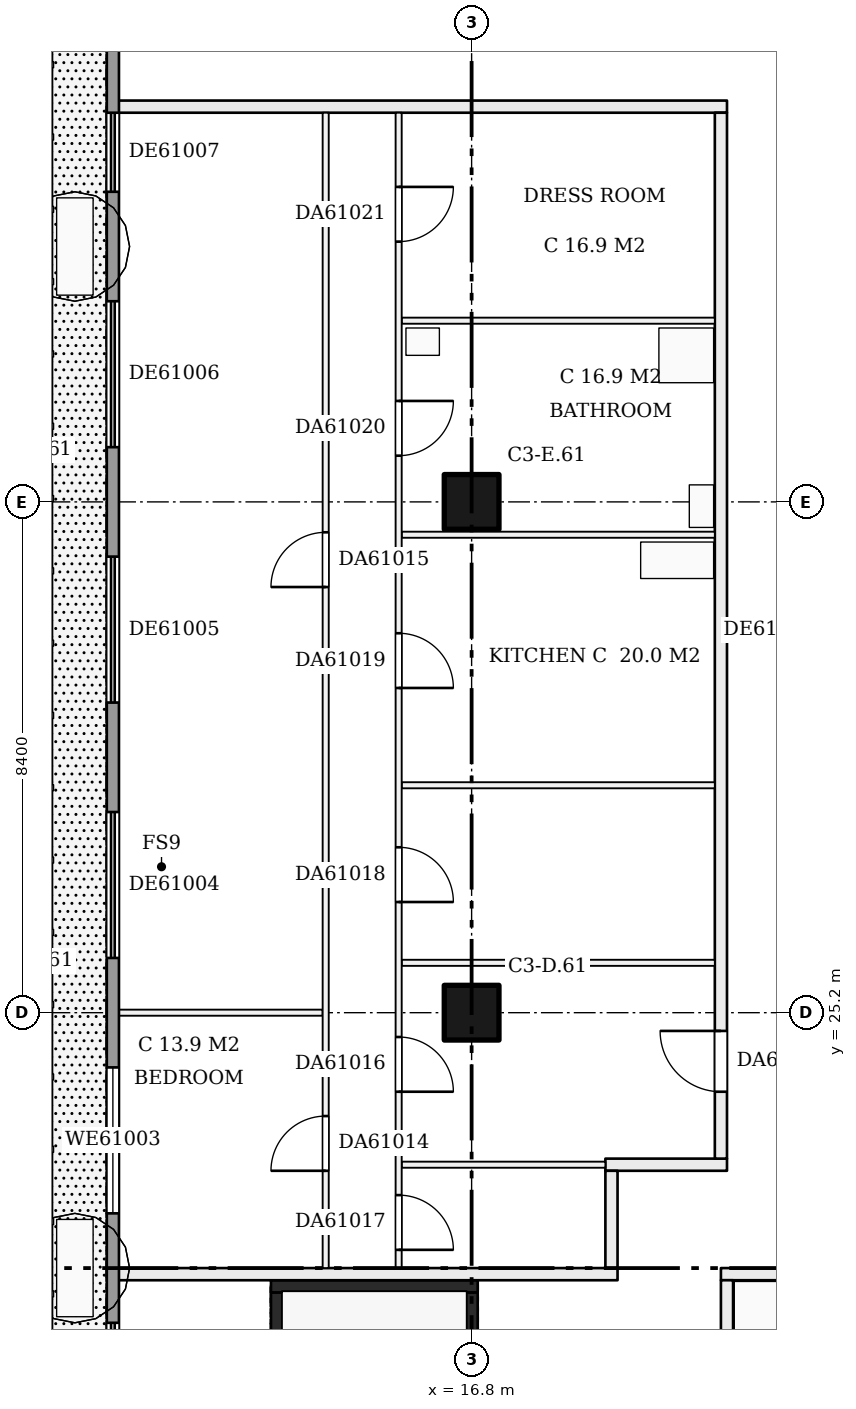
"""IFC4 building model, lengths in metres.
Left out: names, types, materials, properties, quantities, classifications, styles, units other than length and angle.
Written with IfcOpenShell. Run it as: python <this file> out.ifc"""

import sys

from ifc_helpers import new_model, si_unit, direction, frame, frame_2d, origin, origin_2d, place, context, subcontext, project, spatial, rectangle, extrude, element, fill, save


model = new_model("IFC4")
c1 = context("Model", 3, precision=1e-05, world=origin(), true_north=direction((0.0, 1.0)))
c2 = subcontext(c1, "Body", "Model", "MODEL_VIEW")
j1 = project(units=[si_unit("LENGTHUNIT", "METRE"), si_unit("PLANEANGLEUNIT", "RADIAN")], contexts=[c1])
p1 = place(None, origin())
s1 = spatial("IfcSite", under=j1, at=p1, CompositionType="ELEMENT")
p2 = place(p1, origin())
s2 = spatial("IfcBuilding", under=s1, at=p2, CompositionType="ELEMENT")
p3 = place(p2, frame((0.0, 0.0, 235.2)))
s3 = spatial("IfcBuildingStorey", under=s2, at=p3, CompositionType="ELEMENT", Elevation=235.2)
for number, where, z_axis, x_axis in (
    (1, (16.8, 25.2, 0.0), (0.0, 0.0, 1.0), (1.0, 0.0, 0.0)),
    (2, (16.8, 33.6, 0.0), (0.0, 0.0, 1.0), (1.0, 0.0, 0.0)),
):
    element("IfcColumn", number, at=place(p3, frame(where, z_axis=z_axis, x_axis=x_axis)), inside=s3, PredefinedType="COLUMN", context=c2, shape_type="SweptSolid", body=[
        extrude(rectangle(XDim=0.9, YDim=0.9, at=origin_2d()), origin(), (0.0, 0.0, 1.0), 3.22),
    ])
p4 = place(p3, frame((13.6, 13.8, 0.0), z_axis=(0.0, 0.0, 1.0), x_axis=(0.0, 1.0, 0.0)))
e3 = element("IfcWall", 3, at=p4, inside=s3, PredefinedType="SHEAR", context=c2, shape_type="SweptSolid", body=[
    extrude(rectangle(XDim=6.8, YDim=0.2, at=frame_2d((3.4, 0.0))), origin(), (0.0, 0.0, 1.0), 3.22),
])
p5 = place(p3, frame((16.8, 13.8, 0.0), z_axis=(0.0, 0.0, 1.0), x_axis=(0.0, 1.0, 0.0)))
e4 = element("IfcWall", 4, at=p5, inside=s3, PredefinedType="SHEAR", context=c2, shape_type="SweptSolid", body=[
    extrude(rectangle(XDim=6.8, YDim=0.2, at=frame_2d((3.4, 0.0))), origin(), (0.0, 0.0, 1.0), 3.22),
])
p6 = place(p5, frame((0.1, 0.0, 0.0)))
e5 = element("IfcOpeningElement", 5, at=p6, cuts=e4, PredefinedType="OPENING", context=c2, shape_type="SweptSolid", body=[
    extrude(rectangle(XDim=1.0, YDim=2.1, at=frame_2d((0.5, 1.05))), frame((0.0, 0.11, 0.0), z_axis=(0.0, -1.0, 0.0), x_axis=(1.0, 0.0, 0.0)), (0.0, 0.0, 1.0), 0.22),
])
p7 = place(p3, frame((13.5, 20.7, 0.0), z_axis=(0.0, 0.0, 1.0), x_axis=(1.0, 0.0, 0.0)))
e6 = element("IfcWall", 6, at=p7, inside=s3, PredefinedType="SHEAR", context=c2, shape_type="SweptSolid", body=[
    extrude(rectangle(XDim=3.4, YDim=0.2, at=frame_2d((1.7, 0.0))), origin(), (0.0, 0.0, 1.0), 3.22),
])
p8 = place(p3, frame((10.9, 20.9, 0.0), z_axis=(0.0, 0.0, 1.0), x_axis=(1.0, 0.0, 0.0)))
e7 = element("IfcWall", 7, at=p8, inside=s3, PredefinedType="PARTITIONING", context=c2, shape_type="SweptSolid", body=[
    extrude(rectangle(XDim=8.3, YDim=0.2, at=frame_2d((4.15, 0.0))), origin(), (0.0, 0.0, 1.0), 3.22),
])
p9 = place(p3, frame((20.9, 20.9, 0.0), z_axis=(0.0, 0.0, 1.0), x_axis=(1.0, 0.0, 0.0)))
e8 = element("IfcWall", 8, at=p9, inside=s3, PredefinedType="PARTITIONING", context=c2, shape_type="SweptSolid", body=[
    extrude(rectangle(XDim=19.3, YDim=0.2, at=frame_2d((9.65, 0.0))), origin(), (0.0, 0.0, 1.0), 3.22),
])
p10 = place(p9, frame((2.58, 0.0, 0.0)))
e9 = element("IfcOpeningElement", 9, at=p10, cuts=e8, PredefinedType="OPENING", context=c2, shape_type="SweptSolid", body=[
    extrude(rectangle(XDim=1.0, YDim=2.1, at=frame_2d((0.5, 1.05))), frame((0.0, 0.11, 0.0), z_axis=(0.0, -1.0, 0.0), x_axis=(1.0, 0.0, 0.0)), (0.0, 0.0, 1.0), 0.22),
])
p11 = place(p3, frame((15.65, 22.7, 0.0), z_axis=(0.0, 0.0, 1.0), x_axis=(1.0, 0.0, 0.0)))
e10 = element("IfcWall", 10, at=p11, inside=s3, PredefinedType="PARTITIONING", context=c2, shape_type="SweptSolid", body=[
    extrude(rectangle(XDim=3.35, YDim=0.1, at=frame_2d((1.675, 0.0))), origin(), (0.0, 0.0, 1.0), 3.22),
])
p12 = place(p3, frame((19.0, 22.7, 0.0), z_axis=(0.0, 0.0, 1.0), x_axis=(1.0, 0.0, 0.0)))
e11 = element("IfcWall", 11, at=p12, inside=s3, PredefinedType="PARTITIONING", context=c2, shape_type="SweptSolid", body=[
    extrude(rectangle(XDim=2.0, YDim=0.2, at=frame_2d((1.0, 0.0))), origin(), (0.0, 0.0, 1.0), 3.22),
])
p13 = place(p3, frame((10.9, 25.2, 0.0), z_axis=(0.0, 0.0, 1.0), x_axis=(1.0, 0.0, 0.0)))
e12 = element("IfcWall", 12, at=p13, inside=s3, PredefinedType="PARTITIONING", context=c2, shape_type="SweptSolid", body=[
    extrude(rectangle(XDim=3.45, YDim=0.1, at=frame_2d((1.725, 0.0))), origin(), (0.0, 0.0, 1.0), 3.22),
])
for number, where, z_axis, x_axis in (
    (13, (15.65, 26.02, 0.0), (0.0, 0.0, 1.0), (1.0, 0.0, 0.0)),
    (14, (15.65, 28.94, 0.0), (0.0, 0.0, 1.0), (1.0, 0.0, 0.0)),
    (15, (15.65, 33.06, 0.0), (0.0, 0.0, 1.0), (1.0, 0.0, 0.0)),
    (16, (15.65, 36.58, 0.0), (0.0, 0.0, 1.0), (1.0, 0.0, 0.0)),
):
    element("IfcWall", number, at=place(p3, frame(where, z_axis=z_axis, x_axis=x_axis)), inside=s3, PredefinedType="PARTITIONING", context=c2, shape_type="SweptSolid", body=[
        extrude(rectangle(XDim=5.15, YDim=0.1, at=frame_2d((2.575, 0.0))), origin(), (0.0, 0.0, 1.0), 3.22),
    ])
p14 = place(p3, frame((10.9, 40.1, 0.0), z_axis=(0.0, 0.0, 1.0), x_axis=(1.0, 0.0, 0.0)))
e17 = element("IfcWall", 17, at=p14, inside=s3, PredefinedType="PARTITIONING", context=c2, shape_type="SweptSolid", body=[
    extrude(rectangle(XDim=10.1, YDim=0.2, at=frame_2d((5.05, 0.0))), origin(), (0.0, 0.0, 1.0), 3.22),
])
p15 = place(p3, frame((14.4, 21.0, 0.0), z_axis=(0.0, 0.0, 1.0), x_axis=(0.0, 1.0, 0.0)))
e18 = element("IfcWall", 18, at=p15, inside=s3, PredefinedType="PARTITIONING", context=c2, shape_type="SweptSolid", body=[
    extrude(rectangle(XDim=19.0, YDim=0.1, at=frame_2d((9.5, 0.0))), origin(), (0.0, 0.0, 1.0), 3.22),
])
p16 = place(p15, frame((1.6, 0.0, 0.0)))
e19 = element("IfcOpeningElement", 19, at=p16, cuts=e18, PredefinedType="OPENING", context=c2, shape_type="SweptSolid", body=[
    extrude(rectangle(XDim=0.9, YDim=2.1, at=frame_2d((0.45, 1.05))), frame((0.0, 0.06, 0.0), z_axis=(0.0, -1.0, 0.0), x_axis=(1.0, 0.0, 0.0)), (0.0, 0.0, 1.0), 0.12),
])
p17 = place(p15, frame((11.2, 0.0, 0.0)))
e20 = element("IfcOpeningElement", 20, at=p17, cuts=e18, PredefinedType="OPENING", context=c2, shape_type="SweptSolid", body=[
    extrude(rectangle(XDim=0.9, YDim=2.1, at=frame_2d((0.45, 1.05))), frame((0.0, 0.06, 0.0), z_axis=(0.0, -1.0, 0.0), x_axis=(1.0, 0.0, 0.0)), (0.0, 0.0, 1.0), 0.12),
])
p18 = place(p3, frame((15.6, 21.0, 0.0), z_axis=(0.0, 0.0, 1.0), x_axis=(0.0, 1.0, 0.0)))
e21 = element("IfcWall", 21, at=p18, inside=s3, PredefinedType="PARTITIONING", context=c2, shape_type="SweptSolid", body=[
    extrude(rectangle(XDim=19.0, YDim=0.1, at=frame_2d((9.5, 0.0))), origin(), (0.0, 0.0, 1.0), 3.22),
])
p19 = place(p18, frame((2.9, 0.0, 0.0)))
e22 = element("IfcOpeningElement", 22, at=p19, cuts=e21, PredefinedType="OPENING", context=c2, shape_type="SweptSolid", body=[
    extrude(rectangle(XDim=0.9, YDim=2.1, at=frame_2d((0.45, 1.05))), frame((0.0, 0.06, 0.0), z_axis=(0.0, -1.0, 0.0), x_axis=(1.0, 0.0, 0.0)), (0.0, 0.0, 1.0), 0.12),
])
p20 = place(p18, frame((0.3, 0.0, 0.0)))
e23 = element("IfcOpeningElement", 23, at=p20, cuts=e21, PredefinedType="OPENING", context=c2, shape_type="SweptSolid", body=[
    extrude(rectangle(XDim=0.9, YDim=2.1, at=frame_2d((0.45, 1.05))), frame((0.0, 0.06, 0.0), z_axis=(0.0, -1.0, 0.0), x_axis=(1.0, 0.0, 0.0)), (0.0, 0.0, 1.0), 0.12),
])
p21 = place(p18, frame((6.02, 0.0, 0.0)))
e24 = element("IfcOpeningElement", 24, at=p21, cuts=e21, PredefinedType="OPENING", context=c2, shape_type="SweptSolid", body=[
    extrude(rectangle(XDim=0.9, YDim=2.1, at=frame_2d((0.45, 1.05))), frame((0.0, 0.06, 0.0), z_axis=(0.0, -1.0, 0.0), x_axis=(1.0, 0.0, 0.0)), (0.0, 0.0, 1.0), 0.12),
])
p22 = place(p18, frame((9.54, 0.0, 0.0)))
e25 = element("IfcOpeningElement", 25, at=p22, cuts=e21, PredefinedType="OPENING", context=c2, shape_type="SweptSolid", body=[
    extrude(rectangle(XDim=0.9, YDim=2.1, at=frame_2d((0.45, 1.05))), frame((0.0, 0.06, 0.0), z_axis=(0.0, -1.0, 0.0), x_axis=(1.0, 0.0, 0.0)), (0.0, 0.0, 1.0), 0.12),
])
p23 = place(p18, frame((13.36, 0.0, 0.0)))
e26 = element("IfcOpeningElement", 26, at=p23, cuts=e21, PredefinedType="OPENING", context=c2, shape_type="SweptSolid", body=[
    extrude(rectangle(XDim=0.9, YDim=2.1, at=frame_2d((0.45, 1.05))), frame((0.0, 0.06, 0.0), z_axis=(0.0, -1.0, 0.0), x_axis=(1.0, 0.0, 0.0)), (0.0, 0.0, 1.0), 0.12),
])
p24 = place(p18, frame((16.88, 0.0, 0.0)))
e27 = element("IfcOpeningElement", 27, at=p24, cuts=e21, PredefinedType="OPENING", context=c2, shape_type="SweptSolid", body=[
    extrude(rectangle(XDim=0.9, YDim=2.1, at=frame_2d((0.45, 1.05))), frame((0.0, 0.06, 0.0), z_axis=(0.0, -1.0, 0.0), x_axis=(1.0, 0.0, 0.0)), (0.0, 0.0, 1.0), 0.12),
])
p25 = place(p3, frame((19.1, 21.0, 0.0), z_axis=(0.0, 0.0, 1.0), x_axis=(0.0, 1.0, 0.0)))
e28 = element("IfcWall", 28, at=p25, inside=s3, PredefinedType="PARTITIONING", context=c2, shape_type="SweptSolid", body=[
    extrude(rectangle(XDim=1.6, YDim=0.2, at=frame_2d((0.8, 0.0))), origin(), (0.0, 0.0, 1.0), 3.22),
])
p26 = place(p3, frame((20.9, 22.8, 0.0), z_axis=(0.0, 0.0, 1.0), x_axis=(0.0, 1.0, 0.0)))
e29 = element("IfcWall", 29, at=p26, inside=s3, PredefinedType="PARTITIONING", context=c2, shape_type="SweptSolid", body=[
    extrude(rectangle(XDim=17.2, YDim=0.2, at=frame_2d((8.6, 0.0))), origin(), (0.0, 0.0, 1.0), 3.22),
])
p27 = place(p26, frame((1.1, 0.0, 0.0)))
e30 = element("IfcOpeningElement", 30, at=p27, cuts=e29, PredefinedType="OPENING", context=c2, shape_type="SweptSolid", body=[
    extrude(rectangle(XDim=1.0, YDim=2.1, at=frame_2d((0.5, 1.05))), frame((0.0, 0.11, 0.0), z_axis=(0.0, -1.0, 0.0), x_axis=(1.0, 0.0, 0.0)), (0.0, 0.0, 1.0), 0.22),
])
p28 = place(p3, frame((21.0, 13.7, 0.0), z_axis=(0.0, 0.0, 1.0), x_axis=(0.0, 1.0, 0.0)))
e31 = element("IfcWall", 31, at=p28, inside=s3, PredefinedType="PARTITIONING", context=c2, shape_type="SweptSolid", body=[
    extrude(rectangle(XDim=7.1, YDim=0.2, at=frame_2d((3.55, 0.0))), origin(), (0.0, 0.0, 1.0), 3.22),
])
p29 = place(p3, frame((10.9, 42.0, 0.0), z_axis=(0.0, 0.0, 1.0), x_axis=(0.0, -1.0, 0.0)))
e32 = element("IfcWall", 32, at=p29, inside=s3, PredefinedType="SOLIDWALL", context=c2, shape_type="SweptSolid", body=[
    extrude(rectangle(XDim=28.6, YDim=0.2, at=frame_2d((14.3, 0.0))), origin(), (0.0, 0.0, 1.0), 3.22),
])
p30 = place(p29, frame((25.9, 0.0, 0.0)))
e33 = element("IfcOpeningElement", 33, at=p30, cuts=e32, PredefinedType="OPENING", context=c2, shape_type="SweptSolid", body=[
    extrude(rectangle(XDim=2.4, YDim=2.2, at=frame_2d((1.2, 1.1))), frame((0.0, 0.11, 0.0), z_axis=(0.0, -1.0, 0.0), x_axis=(1.0, 0.0, 0.0)), (0.0, 0.0, 1.0), 0.22),
])
p31 = place(p29, frame((21.9, 0.0, 0.0)))
e34 = element("IfcOpeningElement", 34, at=p31, cuts=e32, PredefinedType="OPENING", context=c2, shape_type="SweptSolid", body=[
    extrude(rectangle(XDim=2.4, YDim=2.2, at=frame_2d((1.2, 1.1))), frame((0.0, 0.11, 0.0), z_axis=(0.0, -1.0, 0.0), x_axis=(1.0, 0.0, 0.0)), (0.0, 0.0, 1.0), 0.22),
])
p32 = place(p29, frame((17.7, 0.0, 0.9)))
e35 = element("IfcOpeningElement", 35, at=p32, cuts=e32, PredefinedType="OPENING", context=c2, shape_type="SweptSolid", body=[
    extrude(rectangle(XDim=2.4, YDim=1.5, at=frame_2d((1.2, 0.75))), frame((0.0, 0.11, 0.0), z_axis=(0.0, -1.0, 0.0), x_axis=(1.0, 0.0, 0.0)), (0.0, 0.0, 1.0), 0.22),
])
p33 = place(p29, frame((13.5, 0.0, 0.0)))
e36 = element("IfcOpeningElement", 36, at=p33, cuts=e32, PredefinedType="OPENING", context=c2, shape_type="SweptSolid", body=[
    extrude(rectangle(XDim=2.4, YDim=2.2, at=frame_2d((1.2, 1.1))), frame((0.0, 0.11, 0.0), z_axis=(0.0, -1.0, 0.0), x_axis=(1.0, 0.0, 0.0)), (0.0, 0.0, 1.0), 0.22),
])
p34 = place(p29, frame((9.3, 0.0, 0.0)))
e37 = element("IfcOpeningElement", 37, at=p34, cuts=e32, PredefinedType="OPENING", context=c2, shape_type="SweptSolid", body=[
    extrude(rectangle(XDim=2.4, YDim=2.2, at=frame_2d((1.2, 1.1))), frame((0.0, 0.11, 0.0), z_axis=(0.0, -1.0, 0.0), x_axis=(1.0, 0.0, 0.0)), (0.0, 0.0, 1.0), 0.22),
])
p35 = place(p29, frame((5.1, 0.0, 0.0)))
e38 = element("IfcOpeningElement", 38, at=p35, cuts=e32, PredefinedType="OPENING", context=c2, shape_type="SweptSolid", body=[
    extrude(rectangle(XDim=2.4, YDim=2.2, at=frame_2d((1.2, 1.1))), frame((0.0, 0.11, 0.0), z_axis=(0.0, -1.0, 0.0), x_axis=(1.0, 0.0, 0.0)), (0.0, 0.0, 1.0), 0.22),
])
p36 = place(p29, frame((2.0, 0.0, 0.0)))
e39 = element("IfcOpeningElement", 39, at=p36, cuts=e32, PredefinedType="OPENING", context=c2, shape_type="SweptSolid", body=[
    extrude(rectangle(XDim=1.3, YDim=2.2, at=frame_2d((0.65, 1.1))), frame((0.0, 0.11, 0.0), z_axis=(0.0, -1.0, 0.0), x_axis=(1.0, 0.0, 0.0)), (0.0, 0.0, 1.0), 0.22),
])
p37 = place(p16, origin())
e40 = element("IfcDoor", 40, at=p37, inside=s3, OperationType="SINGLE_SWING_LEFT", PredefinedType="DOOR", context=c2, shape_type="SweptSolid", body=[
    extrude(rectangle(XDim=0.9, YDim=2.1, at=frame_2d((0.45, 1.05))), frame((0.0, 0.025, 0.0), z_axis=(0.0, -1.0, 0.0), x_axis=(1.0, 0.0, 0.0)), (0.0, 0.0, 1.0), 0.05),
])
fill(e19, e40)
p38 = place(p17, origin())
e41 = element("IfcDoor", 41, at=p38, inside=s3, OperationType="SINGLE_SWING_LEFT", PredefinedType="DOOR", context=c2, shape_type="SweptSolid", body=[
    extrude(rectangle(XDim=0.9, YDim=2.1, at=frame_2d((0.45, 1.05))), frame((0.0, 0.025, 0.0), z_axis=(0.0, -1.0, 0.0), x_axis=(1.0, 0.0, 0.0)), (0.0, 0.0, 1.0), 0.05),
])
fill(e20, e41)
p39 = place(p19, frame((0.9, 0.0, 0.0), z_axis=(0.0, 0.0, 1.0), x_axis=(-1.0, 0.0, 0.0)))
e42 = element("IfcDoor", 42, at=p39, inside=s3, OperationType="SINGLE_SWING_RIGHT", PredefinedType="DOOR", context=c2, shape_type="SweptSolid", body=[
    extrude(rectangle(XDim=0.9, YDim=2.1, at=frame_2d((0.45, 1.05))), frame((0.0, 0.025, 0.0), z_axis=(0.0, -1.0, 0.0), x_axis=(1.0, 0.0, 0.0)), (0.0, 0.0, 1.0), 0.05),
])
fill(e22, e42)
p40 = place(p20, frame((0.9, 0.0, 0.0), z_axis=(0.0, 0.0, 1.0), x_axis=(-1.0, 0.0, 0.0)))
e43 = element("IfcDoor", 43, at=p40, inside=s3, OperationType="SINGLE_SWING_RIGHT", PredefinedType="DOOR", context=c2, shape_type="SweptSolid", body=[
    extrude(rectangle(XDim=0.9, YDim=2.1, at=frame_2d((0.45, 1.05))), frame((0.0, 0.025, 0.0), z_axis=(0.0, -1.0, 0.0), x_axis=(1.0, 0.0, 0.0)), (0.0, 0.0, 1.0), 0.05),
])
fill(e23, e43)
p41 = place(p21, frame((0.9, 0.0, 0.0), z_axis=(0.0, 0.0, 1.0), x_axis=(-1.0, 0.0, 0.0)))
e44 = element("IfcDoor", 44, at=p41, inside=s3, OperationType="SINGLE_SWING_RIGHT", PredefinedType="DOOR", context=c2, shape_type="SweptSolid", body=[
    extrude(rectangle(XDim=0.9, YDim=2.1, at=frame_2d((0.45, 1.05))), frame((0.0, 0.025, 0.0), z_axis=(0.0, -1.0, 0.0), x_axis=(1.0, 0.0, 0.0)), (0.0, 0.0, 1.0), 0.05),
])
fill(e24, e44)
p42 = place(p22, frame((0.9, 0.0, 0.0), z_axis=(0.0, 0.0, 1.0), x_axis=(-1.0, 0.0, 0.0)))
e45 = element("IfcDoor", 45, at=p42, inside=s3, OperationType="SINGLE_SWING_RIGHT", PredefinedType="DOOR", context=c2, shape_type="SweptSolid", body=[
    extrude(rectangle(XDim=0.9, YDim=2.1, at=frame_2d((0.45, 1.05))), frame((0.0, 0.025, 0.0), z_axis=(0.0, -1.0, 0.0), x_axis=(1.0, 0.0, 0.0)), (0.0, 0.0, 1.0), 0.05),
])
fill(e25, e45)
p43 = place(p23, frame((0.9, 0.0, 0.0), z_axis=(0.0, 0.0, 1.0), x_axis=(-1.0, 0.0, 0.0)))
e46 = element("IfcDoor", 46, at=p43, inside=s3, OperationType="SINGLE_SWING_LEFT", PredefinedType="DOOR", context=c2, shape_type="SweptSolid", body=[
    extrude(rectangle(XDim=0.9, YDim=2.1, at=frame_2d((0.45, 1.05))), frame((0.0, 0.025, 0.0), z_axis=(0.0, -1.0, 0.0), x_axis=(1.0, 0.0, 0.0)), (0.0, 0.0, 1.0), 0.05),
])
fill(e26, e46)
p44 = place(p24, frame((0.9, 0.0, 0.0), z_axis=(0.0, 0.0, 1.0), x_axis=(-1.0, 0.0, 0.0)))
e47 = element("IfcDoor", 47, at=p44, inside=s3, OperationType="SINGLE_SWING_LEFT", PredefinedType="DOOR", context=c2, shape_type="SweptSolid", body=[
    extrude(rectangle(XDim=0.9, YDim=2.1, at=frame_2d((0.45, 1.05))), frame((0.0, 0.025, 0.0), z_axis=(0.0, -1.0, 0.0), x_axis=(1.0, 0.0, 0.0)), (0.0, 0.0, 1.0), 0.05),
])
fill(e27, e47)
p45 = place(p27, origin())
e48 = element("IfcDoor", 48, at=p45, inside=s3, OperationType="SINGLE_SWING_RIGHT", PredefinedType="DOOR", context=c2, shape_type="SweptSolid", body=[
    extrude(rectangle(XDim=1.0, YDim=2.1, at=frame_2d((0.5, 1.05))), frame((0.0, 0.025, 0.0), z_axis=(0.0, -1.0, 0.0), x_axis=(1.0, 0.0, 0.0)), (0.0, 0.0, 1.0), 0.05),
])
fill(e30, e48)
p46 = place(p31, origin())
e49 = element("IfcDoor", 49, at=p46, inside=s3, OperationType="DOUBLE_DOOR_SLIDING", PredefinedType="DOOR", context=c2, shape_type="SweptSolid", body=[
    extrude(rectangle(XDim=2.4, YDim=2.2, at=frame_2d((1.2, 1.1))), frame((0.0, 0.025, 0.0), z_axis=(0.0, -1.0, 0.0), x_axis=(1.0, 0.0, 0.0)), (0.0, 0.0, 1.0), 0.05),
])
fill(e34, e49)
p47 = place(p32, origin())
e50 = element("IfcWindow", 50, at=p47, inside=s3, PartitioningType="SINGLE_PANEL", PredefinedType="WINDOW", context=c2, shape_type="SweptSolid", body=[
    extrude(rectangle(XDim=2.4, YDim=1.5, at=frame_2d((1.2, 0.75))), frame((0.0, 0.03, 0.0), z_axis=(0.0, -1.0, 0.0), x_axis=(1.0, 0.0, 0.0)), (0.0, 0.0, 1.0), 0.06),
])
fill(e35, e50)
p48 = place(p33, origin())
e51 = element("IfcDoor", 51, at=p48, inside=s3, OperationType="DOUBLE_DOOR_SLIDING", PredefinedType="DOOR", context=c2, shape_type="SweptSolid", body=[
    extrude(rectangle(XDim=2.4, YDim=2.2, at=frame_2d((1.2, 1.1))), frame((0.0, 0.025, 0.0), z_axis=(0.0, -1.0, 0.0), x_axis=(1.0, 0.0, 0.0)), (0.0, 0.0, 1.0), 0.05),
])
fill(e36, e51)
p49 = place(p34, origin())
e52 = element("IfcDoor", 52, at=p49, inside=s3, OperationType="DOUBLE_DOOR_SLIDING", PredefinedType="DOOR", context=c2, shape_type="SweptSolid", body=[
    extrude(rectangle(XDim=2.4, YDim=2.2, at=frame_2d((1.2, 1.1))), frame((0.0, 0.025, 0.0), z_axis=(0.0, -1.0, 0.0), x_axis=(1.0, 0.0, 0.0)), (0.0, 0.0, 1.0), 0.05),
])
fill(e37, e52)
p50 = place(p35, origin())
e53 = element("IfcDoor", 53, at=p50, inside=s3, OperationType="DOUBLE_DOOR_SLIDING", PredefinedType="DOOR", context=c2, shape_type="SweptSolid", body=[
    extrude(rectangle(XDim=2.4, YDim=2.2, at=frame_2d((1.2, 1.1))), frame((0.0, 0.025, 0.0), z_axis=(0.0, -1.0, 0.0), x_axis=(1.0, 0.0, 0.0)), (0.0, 0.0, 1.0), 0.05),
])
fill(e38, e53)
p51 = place(p36, origin())
e54 = element("IfcDoor", 54, at=p51, inside=s3, OperationType="DOUBLE_DOOR_SLIDING", PredefinedType="DOOR", context=c2, shape_type="SweptSolid", body=[
    extrude(rectangle(XDim=1.3, YDim=2.2, at=frame_2d((0.65, 1.1))), frame((0.0, 0.025, 0.0), z_axis=(0.0, -1.0, 0.0), x_axis=(1.0, 0.0, 0.0)), (0.0, 0.0, 1.0), 0.05),
])
fill(e39, e54)
save(model, sys.argv[1])
